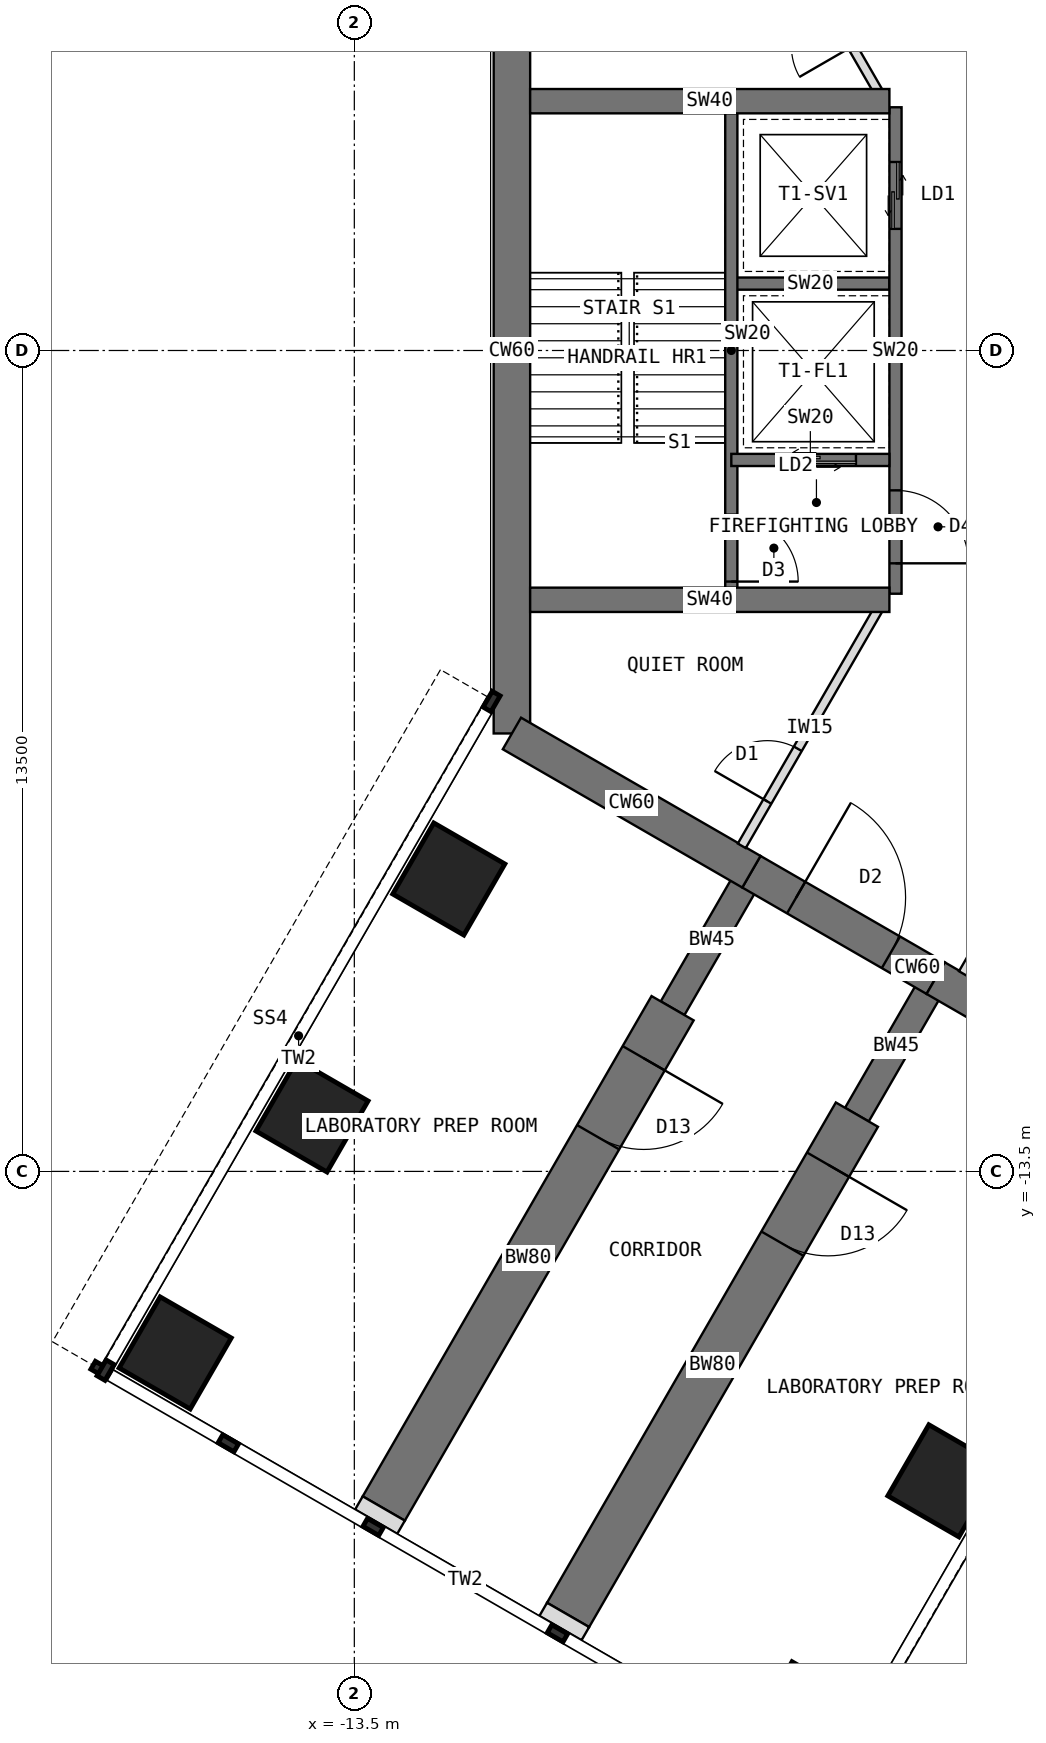
"""IFC4 building model, lengths in metres.
Left out: names, types, materials, properties, quantities, classifications, styles, units other than length and angle.
Written with IfcOpenShell. Run it as: python <this file> out.ifc"""

import sys

from ifc_helpers import new_model, si_unit, direction, frame, frame_2d, origin, origin_2d, place, context, subcontext, project, spatial, rectangle, extrude, element, fill, save


model = new_model("IFC4")
c1 = context("Model", 3, precision=1e-05, world=origin(), true_north=direction((0.0, 1.0)))
c2 = subcontext(c1, "Body", "Model", "MODEL_VIEW")
j1 = project(units=[si_unit("LENGTHUNIT", "METRE"), si_unit("PLANEANGLEUNIT", "RADIAN")], contexts=[c1])
p1 = place(None, origin())
s1 = spatial("IfcSite", under=j1, at=p1, CompositionType="ELEMENT")
p2 = place(p1, origin())
s2 = spatial("IfcBuilding", under=s1, at=p2, CompositionType="ELEMENT")
p3 = place(p2, frame((0.0, 0.0, 113.5)))
s3 = spatial("IfcBuildingStorey", under=s2, at=p3, CompositionType="ELEMENT", Elevation=113.5)
p4 = place(p3, frame((-10.908, 6.298, 0.0), z_axis=(0.0, 0.0, 1.0), x_axis=(0.0, -1.0, 0.0)))
e1 = element("IfcWall", 1, at=p4, inside=s3, PredefinedType="SHEAR", context=c2, shape_type="SweptSolid", body=[
    extrude(rectangle(XDim=12.596, YDim=0.6, at=frame_2d((6.298, 0.0))), origin(), (0.0, 0.0, 1.0), 4.0),
])
p5 = place(p3, frame((-10.908, -6.298, 0.0), z_axis=(0.0, 0.0, 1.0), x_axis=(0.866034513004, -0.499984222037, 0.0)))
e2 = element("IfcWall", 2, at=p5, inside=s3, PredefinedType="SHEAR", context=c2, shape_type="SweptSolid", body=[
    extrude(rectangle(XDim=4.548, YDim=0.6, at=frame_2d((2.274, 0.0))), origin(), (0.0, 0.0, 1.0), 4.0),
])
p6 = place(p3, frame((-6.97, -8.572, 0.0), z_axis=(0.0, 0.0, 1.0), x_axis=(0.866019471182, -0.500010275428, 0.0)))
e3 = element("IfcWall", 3, at=p6, inside=s3, PredefinedType="SHEAR", context=c2, shape_type="SweptSolid", body=[
    extrude(rectangle(XDim=3.5, YDim=0.6, at=frame_2d((1.75, 0.0))), origin(), (0.0, 0.0, 1.0), 4.0),
])
p7 = place(p6, frame((0.85, 0.0, 0.0)))
e4 = element("IfcOpeningElement", 4, at=p7, cuts=e3, PredefinedType="OPENING", context=c2, shape_type="SweptSolid", body=[
    extrude(rectangle(XDim=1.8, YDim=2.1, at=frame_2d((0.9, 1.05))), frame((0.0, 0.31, 0.0), z_axis=(0.0, -1.0, 0.0), x_axis=(1.0, 0.0, 0.0)), (0.0, 0.0, 1.0), 0.62),
])
p8 = place(p3, frame((-3.939, -10.322, 0.0), z_axis=(0.0, 0.0, 1.0), x_axis=(0.866011268655, -0.500024481964, 0.0)))
e5 = element("IfcWall", 5, at=p8, inside=s3, PredefinedType="SHEAR", context=c2, shape_type="SweptSolid", body=[
    extrude(rectangle(XDim=4.548, YDim=0.6, at=frame_2d((2.274, 0.0))), origin(), (0.0, 0.0, 1.0), 4.0),
])
p9 = place(p3, frame((-3.939, -10.322, 0.0), z_axis=(0.0, 0.0, 1.0), x_axis=(-0.499918158782, -0.866072649678, 0.0)))
e6 = element("IfcWall", 6, at=p9, inside=s3, PredefinedType="SHEAR", context=c2, shape_type="SweptSolid", body=[
    extrude(rectangle(XDim=2.592, YDim=0.45, at=frame_2d((1.296, 0.0))), origin(), (0.0, 0.0, 1.0), 4.0),
])
p10 = place(p3, frame((-5.234, -12.566, 0.0), z_axis=(0.0, 0.0, 1.0), x_axis=(-0.499997557548, -0.86602681393, 0.0)))
e7 = element("IfcWall", 7, at=p10, inside=s3, PredefinedType="SHEAR", context=c2, shape_type="SweptSolid", body=[
    extrude(rectangle(XDim=9.5, YDim=0.8, at=frame_2d((4.75, 0.0))), origin(), (0.0, 0.0, 1.0), 4.0),
])
p11 = place(p10, frame((0.95, 0.0, 0.0)))
e8 = element("IfcOpeningElement", 8, at=p11, cuts=e7, PredefinedType="OPENING", context=c2, shape_type="SweptSolid", body=[
    extrude(rectangle(XDim=1.5, YDim=2.1, at=frame_2d((0.75, 1.05))), frame((0.0, 0.41, 0.0), z_axis=(0.0, -1.0, 0.0), x_axis=(1.0, 0.0, 0.0)), (0.0, 0.0, 1.0), 0.82),
])
p12 = place(p3, frame((-6.97, -8.572, 0.0), z_axis=(0.0, 0.0, 1.0), x_axis=(-0.499988811324, -0.866031863473, 0.0)))
e9 = element("IfcWall", 9, at=p12, inside=s3, PredefinedType="SHEAR", context=c2, shape_type="SweptSolid", body=[
    extrude(rectangle(XDim=2.592, YDim=0.45, at=frame_2d((1.296, 0.0))), origin(), (0.0, 0.0, 1.0), 4.0),
])
p13 = place(p3, frame((-8.266, -10.816, 0.0), z_axis=(0.0, 0.0, 1.0), x_axis=(-0.499997557548, -0.86602681393, 0.0)))
e10 = element("IfcWall", 10, at=p13, inside=s3, PredefinedType="SHEAR", context=c2, shape_type="SweptSolid", body=[
    extrude(rectangle(XDim=9.5, YDim=0.8, at=frame_2d((4.75, 0.0))), origin(), (0.0, 0.0, 1.0), 4.0),
])
p14 = place(p13, frame((0.95, 0.0, 0.0)))
e11 = element("IfcOpeningElement", 11, at=p14, cuts=e10, PredefinedType="OPENING", context=c2, shape_type="SweptSolid", body=[
    extrude(rectangle(XDim=1.5, YDim=2.1, at=frame_2d((0.75, 1.05))), frame((0.0, 0.41, 0.0), z_axis=(0.0, -1.0, 0.0), x_axis=(1.0, 0.0, 0.0)), (0.0, 0.0, 1.0), 0.82),
])
for number, where, z_axis, x_axis in (
    (12, (-11.946, -8.691, 0.0), (0.0, 0.0, 1.0), (0.5, 0.866, 0.0)),
    (13, (-3.804, -18.588, 0.0), (0.0, 0.0, 1.0), (0.5, 0.866, 0.0)),
    (14, (-14.196, -12.588, 0.0), (0.0, 0.0, 1.0), (0.5, 0.866, 0.0)),
    (15, (-6.054, -22.486, 0.0), (0.0, 0.0, 1.0), (0.5, 0.866, 0.0)),
    (16, (-16.446, -16.486, 0.0), (0.0, 0.0, 1.0), (0.5, 0.866, 0.0)),
):
    element("IfcColumn", number, at=place(p3, frame(where, z_axis=z_axis, x_axis=x_axis)), inside=s3, PredefinedType="COLUMN", context=c2, shape_type="SweptSolid", body=[
        extrude(rectangle(XDim=1.35, YDim=1.35, at=origin_2d()), origin(), (0.0, 0.0, 1.0), 4.0),
    ])
for number, where, z_axis, x_axis in (
    (17, (-9.984, -20.794, 0.0), (0.0, 0.0, 1.0), (-0.5, -0.866, 0.0)),
    (18, (-13.016, -19.044, 0.0), (0.0, 0.0, 1.0), (-0.5, -0.866, 0.0)),
):
    element("IfcWall", number, at=place(p3, frame(where, z_axis=z_axis, x_axis=x_axis)), inside=s3, PredefinedType="PARTITIONING", context=c2, shape_type="SweptSolid", body=[
        extrude(rectangle(XDim=0.25, YDim=0.8, at=frame_2d((0.125, 0.0))), origin(), (0.0, 0.0, 1.0), 3.8),
    ])
p15 = place(p3, frame((-4.6, 4.0, 0.0), z_axis=(0.0, 0.0, 1.0), x_axis=(0.0, -1.0, 0.0)))
e19 = element("IfcWall", 19, at=p15, inside=s3, PredefinedType="SHEAR", context=c2, shape_type="SweptSolid", body=[
    extrude(rectangle(XDim=8.0, YDim=0.2, at=frame_2d((4.0, 0.0))), origin(), (0.0, 0.0, 1.0), 4.0),
])
p16 = place(p15, frame((6.3, 0.0, 0.0)))
e20 = element("IfcOpeningElement", 20, at=p16, cuts=e19, PredefinedType="OPENING", context=c2, shape_type="SweptSolid", body=[
    extrude(rectangle(XDim=1.2, YDim=2.1, at=frame_2d((0.6, 1.05))), frame((0.0, 0.11, 0.0), z_axis=(0.0, -1.0, 0.0), x_axis=(1.0, 0.0, 0.0)), (0.0, 0.0, 1.0), 0.22),
])
p17 = place(p15, frame((0.9, 0.0, 0.0)))
e21 = element("IfcOpeningElement", 21, at=p17, cuts=e19, PredefinedType="OPENING", context=c2, shape_type="SweptSolid", body=[
    extrude(rectangle(XDim=1.1, YDim=2.2, at=frame_2d((0.55, 1.1))), frame((0.0, 0.11, 0.0), z_axis=(0.0, -1.0, 0.0), x_axis=(1.0, 0.0, 0.0)), (0.0, 0.0, 1.0), 0.22),
])
p18 = place(p3, frame((-4.7, 1.1, 0.0), z_axis=(0.0, 0.0, 1.0), x_axis=(-1.0, 0.0, 0.0)))
e22 = element("IfcWall", 22, at=p18, inside=s3, PredefinedType="SHEAR", context=c2, shape_type="SweptSolid", body=[
    extrude(rectangle(XDim=2.6, YDim=0.2, at=frame_2d((1.3, 0.0))), origin(), (0.0, 0.0, 1.0), 4.0),
])
p19 = place(p3, frame((-4.7, -1.8, 0.0), z_axis=(0.0, 0.0, 1.0), x_axis=(-1.0, 0.0, 0.0)))
e23 = element("IfcWall", 23, at=p19, inside=s3, PredefinedType="SHEAR", context=c2, shape_type="SweptSolid", body=[
    extrude(rectangle(XDim=2.6, YDim=0.2, at=frame_2d((1.3, 0.0))), origin(), (0.0, 0.0, 1.0), 4.0),
])
p20 = place(p19, frame((0.55, 0.0, 0.0)))
e24 = element("IfcOpeningElement", 24, at=p20, cuts=e23, PredefinedType="OPENING", context=c2, shape_type="SweptSolid", body=[
    extrude(rectangle(XDim=1.3, YDim=2.2, at=frame_2d((0.65, 1.1))), frame((0.0, 0.11, 0.0), z_axis=(0.0, -1.0, 0.0), x_axis=(1.0, 0.0, 0.0)), (0.0, 0.0, 1.0), 0.22),
])
p21 = place(p3, frame((-7.3, 4.0, 0.0), z_axis=(0.0, 0.0, 1.0), x_axis=(0.0, -1.0, 0.0)))
e25 = element("IfcWall", 25, at=p21, inside=s3, PredefinedType="SHEAR", context=c2, shape_type="SweptSolid", body=[
    extrude(rectangle(XDim=8.0, YDim=0.2, at=frame_2d((4.0, 0.0))), origin(), (0.0, 0.0, 1.0), 4.0),
])
p22 = place(p21, frame((6.7, 0.0, 0.0)))
e26 = element("IfcOpeningElement", 26, at=p22, cuts=e25, PredefinedType="OPENING", context=c2, shape_type="SweptSolid", body=[
    extrude(rectangle(XDim=1.1, YDim=2.1, at=frame_2d((0.55, 1.05))), frame((0.0, 0.11, 0.0), z_axis=(0.0, -1.0, 0.0), x_axis=(1.0, 0.0, 0.0)), (0.0, 0.0, 1.0), 0.22),
])
for number, where, z_axis, x_axis in (
    (27, (-4.7, -4.1, 0.0), (0.0, 0.0, 1.0), (-1.0, 0.0, 0.0)),
    (28, (-4.7, 4.1, 0.0), (0.0, 0.0, 1.0), (-1.0, 0.0, 0.0)),
):
    element("IfcWall", number, at=place(p3, frame(where, z_axis=z_axis, x_axis=x_axis)), inside=s3, PredefinedType="SHEAR", context=c2, shape_type="SweptSolid", body=[
        extrude(rectangle(XDim=5.908, YDim=0.4, at=frame_2d((2.954, 0.0))), origin(), (0.0, 0.0, 1.0), 4.0),
    ])
p23 = place(p3, frame((-1.253, -6.37, 0.0), z_axis=(0.0, 0.0, 1.0), x_axis=(-0.499999473313, -0.866025707867, 0.0)))
e29 = element("IfcWall", 29, at=p23, inside=s3, PredefinedType="PARTITIONING", context=c2, shape_type="SweptSolid", body=[
    extrude(rectangle(XDim=4.476, YDim=0.15, at=frame_2d((2.238, 0.0))), origin(), (0.0, 0.0, 1.0), 3.8),
])
p24 = place(p23, frame((2.633, 0.0, 0.0)))
e30 = element("IfcOpeningElement", 30, at=p24, cuts=e29, PredefinedType="OPENING", context=c2, shape_type="SweptSolid", body=[
    extrude(rectangle(XDim=1.0, YDim=2.1, at=frame_2d((0.5, 1.05))), frame((0.0, 0.085, 0.0), z_axis=(0.0, -1.0, 0.0), x_axis=(1.0, 0.0, 0.0)), (0.0, 0.0, 1.0), 0.17),
])
p25 = place(p3, frame((-7.128, -8.146, 0.0), z_axis=(0.0, 0.0, 1.0), x_axis=(0.499999473313, 0.866025707867, 0.0)))
e31 = element("IfcWall", 31, at=p25, inside=s3, PredefinedType="PARTITIONING", context=c2, shape_type="SweptSolid", body=[
    extrude(rectangle(XDim=4.476, YDim=0.15, at=frame_2d((2.238, 0.0))), origin(), (0.0, 0.0, 1.0), 3.8),
])
p26 = place(p25, frame((0.843, 0.0, 0.0)))
e32 = element("IfcOpeningElement", 32, at=p26, cuts=e31, PredefinedType="OPENING", context=c2, shape_type="SweptSolid", body=[
    extrude(rectangle(XDim=1.0, YDim=2.1, at=frame_2d((0.5, 1.05))), frame((0.0, 0.085, 0.0), z_axis=(0.0, -1.0, 0.0), x_axis=(1.0, 0.0, 0.0)), (0.0, 0.0, 1.0), 0.17),
])
p27 = place(p3, frame((-4.89, 4.27, 0.0), z_axis=(0.0, 0.0, 1.0), x_axis=(-0.499999473313, 0.866025707867, 0.0)))
e33 = element("IfcWall", 33, at=p27, inside=s3, PredefinedType="PARTITIONING", context=c2, shape_type="SweptSolid", body=[
    extrude(rectangle(XDim=4.476, YDim=0.15, at=frame_2d((2.238, 0.0))), origin(), (0.0, 0.0, 1.0), 3.8),
])
p28 = place(p27, frame((0.843, 0.0, 0.0)))
e34 = element("IfcOpeningElement", 34, at=p28, cuts=e33, PredefinedType="OPENING", context=c2, shape_type="SweptSolid", body=[
    extrude(rectangle(XDim=1.0, YDim=2.1, at=frame_2d((0.5, 1.05))), frame((0.0, 0.085, 0.0), z_axis=(0.0, -1.0, 0.0), x_axis=(1.0, 0.0, 0.0)), (0.0, 0.0, 1.0), 0.17),
])
p29 = place(p16, origin())
e35 = element("IfcDoor", 35, at=p29, inside=s3, OperationType="SINGLE_SWING_RIGHT", PredefinedType="DOOR", context=c2, shape_type="SweptSolid", body=[
    extrude(rectangle(XDim=1.2, YDim=2.1, at=frame_2d((0.6, 1.05))), frame((0.0, 0.025, 0.0), z_axis=(0.0, -1.0, 0.0), x_axis=(1.0, 0.0, 0.0)), (0.0, 0.0, 1.0), 0.05),
])
fill(e20, e35)
p30 = place(p20, origin())
e36 = element("IfcDoor", 36, at=p30, inside=s3, OperationType="DOUBLE_DOOR_SLIDING", PredefinedType="DOOR", context=c2, shape_type="SweptSolid", body=[
    extrude(rectangle(XDim=1.3, YDim=2.2, at=frame_2d((0.65, 1.1))), frame((0.0, 0.025, 0.0), z_axis=(0.0, -1.0, 0.0), x_axis=(1.0, 0.0, 0.0)), (0.0, 0.0, 1.0), 0.05),
])
fill(e24, e36)
p31 = place(p17, origin())
e37 = element("IfcDoor", 37, at=p31, inside=s3, OperationType="DOUBLE_DOOR_SLIDING", PredefinedType="DOOR", context=c2, shape_type="SweptSolid", body=[
    extrude(rectangle(XDim=1.1, YDim=2.2, at=frame_2d((0.55, 1.1))), frame((0.0, 0.025, 0.0), z_axis=(0.0, -1.0, 0.0), x_axis=(1.0, 0.0, 0.0)), (0.0, 0.0, 1.0), 0.05),
])
fill(e21, e37)
p32 = place(p22, origin())
e38 = element("IfcDoor", 38, at=p32, inside=s3, OperationType="SINGLE_SWING_RIGHT", PredefinedType="DOOR", context=c2, shape_type="SweptSolid", body=[
    extrude(rectangle(XDim=1.1, YDim=2.1, at=frame_2d((0.55, 1.05))), frame((0.0, 0.025, 0.0), z_axis=(0.0, -1.0, 0.0), x_axis=(1.0, 0.0, 0.0)), (0.0, 0.0, 1.0), 0.05),
])
fill(e26, e38)
p33 = place(p7, origin())
e39 = element("IfcDoor", 39, at=p33, inside=s3, OperationType="DOUBLE_DOOR_DOUBLE_SWING", PredefinedType="DOOR", context=c2, shape_type="SweptSolid", body=[
    extrude(rectangle(XDim=1.72, YDim=2.06, at=frame_2d((0.9, 1.03))), frame((0.0, 0.025, 0.0), z_axis=(0.0, -1.0, 0.0), x_axis=(1.0, 0.0, 0.0)), (0.0, 0.0, 1.0), 0.05),
    extrude(rectangle(XDim=0.04, YDim=2.1, at=frame_2d((0.02, 1.05))), frame((0.0, 0.3, 0.0), z_axis=(0.0, -1.0, 0.0), x_axis=(1.0, 0.0, 0.0)), (0.0, 0.0, 1.0), 0.6),
    extrude(rectangle(XDim=0.04, YDim=2.1, at=frame_2d((1.78, 1.05))), frame((0.0, 0.3, 0.0), z_axis=(0.0, -1.0, 0.0), x_axis=(1.0, 0.0, 0.0)), (0.0, 0.0, 1.0), 0.6),
    extrude(rectangle(XDim=1.72, YDim=0.04, at=frame_2d((0.9, 2.08))), frame((0.0, 0.3, 0.0), z_axis=(0.0, -1.0, 0.0), x_axis=(1.0, 0.0, 0.0)), (0.0, 0.0, 1.0), 0.6),
])
fill(e4, e39)
p34 = place(p26, origin())
e40 = element("IfcDoor", 40, at=p34, inside=s3, OperationType="SINGLE_SWING_LEFT", PredefinedType="DOOR", context=c2, shape_type="SweptSolid", body=[
    extrude(rectangle(XDim=1.0, YDim=2.1, at=frame_2d((0.5, 1.05))), frame((0.0, 0.025, 0.0), z_axis=(0.0, -1.0, 0.0), x_axis=(1.0, 0.0, 0.0)), (0.0, 0.0, 1.0), 0.05),
])
fill(e32, e40)
p35 = place(p11, origin())
e41 = element("IfcDoor", 41, at=p35, inside=s3, OperationType="DOUBLE_DOOR_SINGLE_SWING", PredefinedType="DOOR", context=c2, shape_type="SweptSolid", body=[
    extrude(rectangle(XDim=1.42, YDim=2.06, at=frame_2d((0.75, 1.03))), frame((0.0, 0.025, 0.0), z_axis=(0.0, -1.0, 0.0), x_axis=(1.0, 0.0, 0.0)), (0.0, 0.0, 1.0), 0.05),
    extrude(rectangle(XDim=0.04, YDim=2.1, at=frame_2d((0.02, 1.05))), frame((0.0, 0.4, 0.0), z_axis=(0.0, -1.0, 0.0), x_axis=(1.0, 0.0, 0.0)), (0.0, 0.0, 1.0), 0.8),
    extrude(rectangle(XDim=0.04, YDim=2.1, at=frame_2d((1.48, 1.05))), frame((0.0, 0.4, 0.0), z_axis=(0.0, -1.0, 0.0), x_axis=(1.0, 0.0, 0.0)), (0.0, 0.0, 1.0), 0.8),
    extrude(rectangle(XDim=1.42, YDim=0.04, at=frame_2d((0.75, 2.08))), frame((0.0, 0.4, 0.0), z_axis=(0.0, -1.0, 0.0), x_axis=(1.0, 0.0, 0.0)), (0.0, 0.0, 1.0), 0.8),
])
fill(e8, e41)
p36 = place(p14, origin())
e42 = element("IfcDoor", 42, at=p36, inside=s3, OperationType="DOUBLE_DOOR_SINGLE_SWING", PredefinedType="DOOR", context=c2, shape_type="SweptSolid", body=[
    extrude(rectangle(XDim=1.42, YDim=2.06, at=frame_2d((0.75, 1.03))), frame((0.0, 0.025, 0.0), z_axis=(0.0, -1.0, 0.0), x_axis=(1.0, 0.0, 0.0)), (0.0, 0.0, 1.0), 0.05),
    extrude(rectangle(XDim=0.04, YDim=2.1, at=frame_2d((0.02, 1.05))), frame((0.0, 0.4, 0.0), z_axis=(0.0, -1.0, 0.0), x_axis=(1.0, 0.0, 0.0)), (0.0, 0.0, 1.0), 0.8),
    extrude(rectangle(XDim=0.04, YDim=2.1, at=frame_2d((1.48, 1.05))), frame((0.0, 0.4, 0.0), z_axis=(0.0, -1.0, 0.0), x_axis=(1.0, 0.0, 0.0)), (0.0, 0.0, 1.0), 0.8),
    extrude(rectangle(XDim=1.42, YDim=0.04, at=frame_2d((0.75, 2.08))), frame((0.0, 0.4, 0.0), z_axis=(0.0, -1.0, 0.0), x_axis=(1.0, 0.0, 0.0)), (0.0, 0.0, 1.0), 0.8),
])
fill(e11, e42)
save(model, sys.argv[1])
